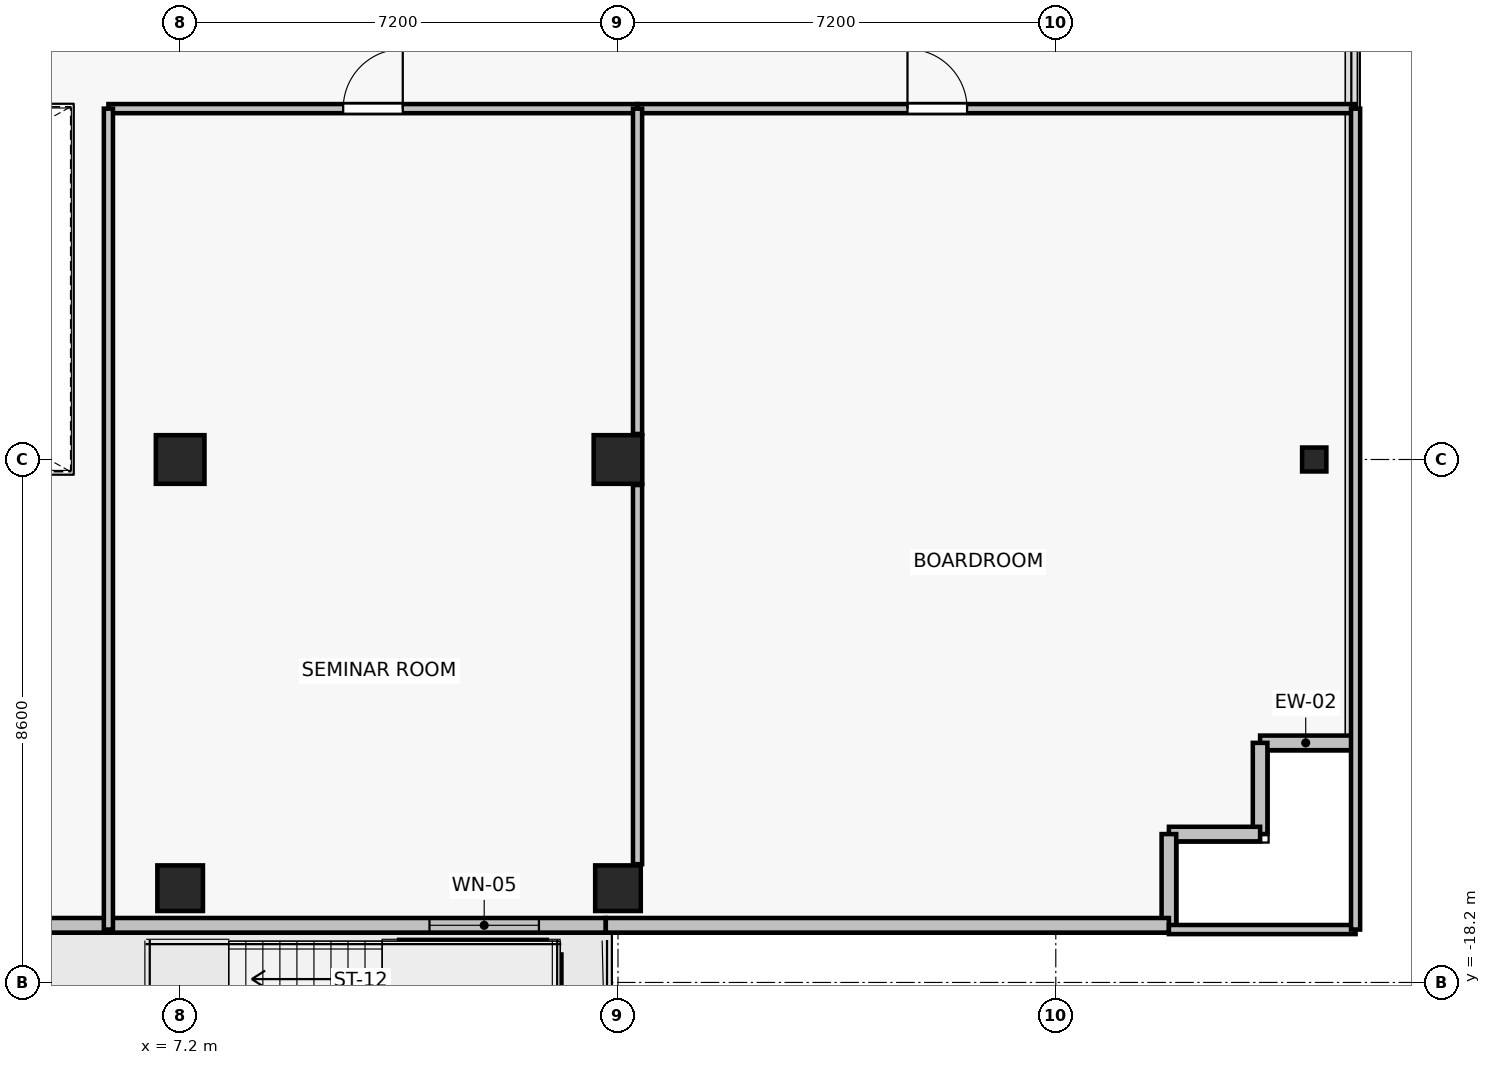
"""IFC4 building model, lengths in metres.
Left out: names, types, materials, properties, quantities, classifications, styles, units other than length and angle.
Written with IfcOpenShell. Run it as: python <this file> out.ifc"""

import sys

from ifc_helpers import new_model, si_unit, direction, frame, frame_2d, origin, origin_2d, place, context, subcontext, project, spatial, rectangle, i_section, extrude, source, transform, mapped, element, fill, save


model = new_model("IFC4")
c1 = context("Model", 3, precision=1e-05, world=origin(), true_north=direction((0.0, 1.0)))
c2 = subcontext(c1, "Body", "Model", "MODEL_VIEW")
j1 = project(units=[si_unit("LENGTHUNIT", "METRE"), si_unit("PLANEANGLEUNIT", "RADIAN")], contexts=[c1])
p1 = place(None, origin())
s1 = spatial("IfcSite", under=j1, at=p1, CompositionType="ELEMENT")
p2 = place(p1, origin())
s2 = spatial("IfcBuilding", under=s1, at=p2, CompositionType="ELEMENT")
p3 = place(p2, frame((0.0, 0.0, 172.6)))
s3 = spatial("IfcBuildingStorey", under=s2, at=p3, CompositionType="ELEMENT", Elevation=172.6)
for number, where, z_axis, x_axis in (
    (1, (7.2, -9.6, 0.0), (0.0, 0.0, 1.0), (1.0, 0.0, 0.0)),
    (2, (14.4, -9.6, 0.0), (0.0, 0.0, 1.0), (1.0, 0.0, 0.0)),
):
    element("IfcColumn", number, at=place(p3, frame(where, z_axis=z_axis, x_axis=x_axis)), inside=s3, PredefinedType="COLUMN", context=c2, shape_type="SweptSolid", body=[
        extrude(rectangle(XDim=0.8, YDim=0.8, at=origin_2d()), origin(), (0.0, 0.0, 1.0), 3.3),
    ])
for number, where, z_axis, x_axis in (
    (3, (7.2, -16.65, 0.0), (0.0, 0.0, 1.0), (1.0, 0.0, 0.0)),
    (4, (14.4, -16.65, 0.0), (0.0, 0.0, 1.0), (1.0, 0.0, 0.0)),
):
    element("IfcColumn", number, at=place(p3, frame(where, z_axis=z_axis, x_axis=x_axis)), inside=s3, PredefinedType="COLUMN", context=c2, shape_type="SweptSolid", body=[
        extrude(rectangle(XDim=0.75, YDim=0.75, at=origin_2d()), origin(), (0.0, 0.0, 1.0), 3.3),
    ])
p4 = place(p3, frame((25.85, -9.6, 0.0), z_axis=(0.0, 0.0, 1.0), x_axis=(1.0, 0.0, 0.0)))
e5 = element("IfcColumn", 5, at=p4, inside=s3, PredefinedType="COLUMN", context=c2, shape_type="SweptSolid", body=[
    extrude(i_section(OverallWidth=0.399, OverallDepth=0.394, WebThickness=0.023, FlangeThickness=0.037, FilletRadius=0.015, at=origin_2d()), origin(), (0.0, 0.0, 1.0), 3.3),
])
p5 = place(p3, frame((14.2, -17.26, 0.0), z_axis=(0.0, 0.0, 1.0), x_axis=(-1.0, 0.0, 0.0)))
e6 = element("IfcWall", 6, at=p5, inside=s3, PredefinedType="SOLIDWALL", context=c2, shape_type="SweptSolid", body=[
    extrude(rectangle(XDim=11.0, YDim=0.24, at=frame_2d((5.5, 0.0))), origin(), (0.0, 0.0, 1.0), 2.59),
])
p6 = place(p5, frame((9.25, 0.0, 0.0)))
e7 = element("IfcOpeningElement", 7, at=p6, cuts=e6, PredefinedType="OPENING", context=c2, shape_type="SweptSolid", body=[
    extrude(rectangle(XDim=1.5, YDim=2.2, at=frame_2d((0.75, 1.1))), frame((0.0, 0.13, 0.0), z_axis=(0.0, -1.0, 0.0), x_axis=(1.0, 0.0, 0.0)), (0.0, 0.0, 1.0), 0.26),
])
p7 = place(p5, frame((1.1, 0.0, 0.85)))
e8 = element("IfcOpeningElement", 8, at=p7, cuts=e6, PredefinedType="OPENING", context=c2, shape_type="SweptSolid", body=[
    extrude(rectangle(XDim=1.8, YDim=1.6, at=frame_2d((0.9, 0.8))), frame((0.0, 0.13, 0.0), z_axis=(0.0, -1.0, 0.0), x_axis=(1.0, 0.0, 0.0)), (0.0, 0.0, 1.0), 0.26),
])
for number, where, z_axis, x_axis in (
    (9, (24.96, -14.26, 0.0), (0.0, 0.0, 1.0), (1.0, 0.0, 0.0)),
    (10, (24.96, -15.76, 0.0), (0.0, 0.0, 1.0), (0.0, 1.0, 0.0)),
    (11, (23.46, -15.76, 0.0), (0.0, 0.0, 1.0), (1.0, 0.0, 0.0)),
    (12, (23.46, -17.26, 0.0), (0.0, 0.0, 1.0), (0.0, 1.0, 0.0)),
):
    element("IfcWall", number, at=place(p3, frame(where, z_axis=z_axis, x_axis=x_axis)), inside=s3, PredefinedType="SOLIDWALL", context=c2, shape_type="SweptSolid", body=[
        extrude(rectangle(XDim=1.5, YDim=0.24, at=frame_2d((0.75, 0.0))), origin(), (0.0, 0.0, 1.0), 3.075),
    ])
p8 = place(p3, frame((14.2, -17.26, 0.0), z_axis=(0.0, 0.0, 1.0), x_axis=(1.0, 0.0, 0.0)))
e13 = element("IfcWall", 13, at=p8, inside=s3, PredefinedType="SOLIDWALL", context=c2, shape_type="SweptSolid", body=[
    extrude(rectangle(XDim=9.26, YDim=0.24, at=frame_2d((4.63, 0.0))), origin(), (0.0, 0.0, 1.0), 3.075),
])
p9 = place(p3, frame((13.37, -19.92, -0.25), z_axis=(0.0, 0.0, 1.0), x_axis=(0.0, 1.0, 0.0)))
e14 = element("IfcWall", 14, at=p9, inside=s3, PredefinedType="SOLIDWALL", context=c2, shape_type="SweptSolid", body=[
    extrude(rectangle(XDim=2.18, YDim=0.2, at=frame_2d((1.09, 0.0))), origin(), (0.0, 0.0, 1.0), 1.7),
])
p10 = place(p3, frame((10.8, -17.6, -0.25), z_axis=(0.0, 0.0, 1.0), x_axis=(1.0, 0.0, 0.0)))
e15 = element("IfcWall", 15, at=p10, inside=s3, PredefinedType="SOLIDWALL", context=c2, shape_type="SweptSolid", body=[
    extrude(rectangle(XDim=2.43, YDim=0.2, at=frame_2d((1.215, 0.0))), origin(), (0.0, 0.0, 1.0), 1.7),
])
p11 = place(p3, frame((6.02, -3.83, 0.0), z_axis=(0.0, 0.0, 1.0), x_axis=(1.0, 0.0, 0.0)))
e16 = element("IfcWall", 16, at=p11, inside=s3, PredefinedType="PARTITIONING", context=c2, shape_type="SweptSolid", body=[
    extrude(rectangle(XDim=8.702, YDim=0.15, at=frame_2d((4.351, 0.0))), origin(), (0.0, 0.0, 1.0), 2.565),
])
p12 = place(p11, frame((3.861, 0.0, 0.0)))
e17 = element("IfcOpeningElement", 17, at=p12, cuts=e16, PredefinedType="OPENING", context=c2, shape_type="SweptSolid", body=[
    extrude(rectangle(XDim=0.98, YDim=2.15, at=frame_2d((0.49, 1.075))), frame((0.0, 0.085, 0.0), z_axis=(0.0, -1.0, 0.0), x_axis=(1.0, 0.0, 0.0)), (0.0, 0.0, 1.0), 0.17),
])
p13 = place(p3, frame((6.02, -17.33, 0.0), z_axis=(0.0, 0.0, 1.0), x_axis=(0.0, 1.0, 0.0)))
e18 = element("IfcWall", 18, at=p13, inside=s3, PredefinedType="PARTITIONING", context=c2, shape_type="SweptSolid", body=[
    extrude(rectangle(XDim=13.5, YDim=0.15, at=frame_2d((6.75, 0.0))), origin(), (0.0, 0.0, 1.0), 2.565),
])
p14 = place(p3, frame((14.722, -10.02, 0.0), z_axis=(0.0, 0.0, 1.0), x_axis=(0.0, -1.0, 0.0)))
e19 = element("IfcWall", 19, at=p14, inside=s3, PredefinedType="PARTITIONING", context=c2, shape_type="SweptSolid", body=[
    extrude(rectangle(XDim=6.235, YDim=0.15, at=frame_2d((3.117, 0.0))), origin(), (0.0, 0.0, 1.0), 3.075),
])
p15 = place(p3, frame((26.53, -17.33, 0.0), z_axis=(0.0, 0.0, 1.0), x_axis=(-1.0, 0.0, 0.0)))
e20 = element("IfcWall", 20, at=p15, inside=s3, PredefinedType="PARTITIONING", context=c2, shape_type="SweptSolid", body=[
    extrude(rectangle(XDim=3.07, YDim=0.15, at=frame_2d((1.535, 0.0))), origin(), (0.0, 0.0, 1.0), 3.075),
])
p16 = place(p3, frame((14.722, -3.83, 0.0), z_axis=(0.0, 0.0, 1.0), x_axis=(1.0, 0.0, 0.0)))
e21 = element("IfcWall", 21, at=p16, inside=s3, PredefinedType="PARTITIONING", context=c2, shape_type="SweptSolid", body=[
    extrude(rectangle(XDim=11.808, YDim=0.15, at=frame_2d((5.904, 0.0))), origin(), (0.0, 0.0, 1.0), 2.565),
])
p17 = place(p16, frame((4.439, 0.0, 0.0)))
e22 = element("IfcOpeningElement", 22, at=p17, cuts=e21, PredefinedType="OPENING", context=c2, shape_type="SweptSolid", body=[
    extrude(rectangle(XDim=0.98, YDim=2.15, at=frame_2d((0.49, 1.075))), frame((0.0, 0.085, 0.0), z_axis=(0.0, -1.0, 0.0), x_axis=(1.0, 0.0, 0.0)), (0.0, 0.0, 1.0), 0.17),
])
p18 = place(p3, frame((14.722, -9.18, 0.0), z_axis=(0.0, 0.0, 1.0), x_axis=(0.0, 1.0, 0.0)))
e23 = element("IfcWall", 23, at=p18, inside=s3, PredefinedType="PARTITIONING", context=c2, shape_type="SweptSolid", body=[
    extrude(rectangle(XDim=5.35, YDim=0.15, at=frame_2d((2.675, 0.0))), origin(), (0.0, 0.0, 1.0), 2.665),
])
p19 = place(p3, frame((26.53, -3.83, 0.0), z_axis=(0.0, 0.0, 1.0), x_axis=(0.0, -1.0, 0.0)))
e24 = element("IfcWall", 24, at=p19, inside=s3, PredefinedType="PARTITIONING", context=c2, shape_type="SweptSolid", body=[
    extrude(rectangle(XDim=13.5, YDim=0.15, at=frame_2d((6.75, 0.0))), origin(), (0.0, 0.0, 1.0), 2.665),
])
m1 = source(origin(), c2, "Body", "SweptSolid", [
    extrude(rectangle(XDim=1.8, YDim=1.6, at=frame_2d((0.9, 0.8))), frame((0.0, 0.03, 0.0), z_axis=(0.0, -1.0, 0.0), x_axis=(1.0, 0.0, 0.0)), (0.0, 0.0, 1.0), 0.06),
])
p20 = place(p7, origin())
e25 = element("IfcWindow", 25, at=p20, inside=s3, PartitioningType="SINGLE_PANEL", PredefinedType="WINDOW", context=c2, shape_type="MappedRepresentation", body=[
    mapped(m1, transform((0.0, 0.0, 0.0), x_axis=(1.0, 0.0, 0.0), y_axis=(0.0, 1.0, 0.0), z_axis=(0.0, 0.0, 1.0), scale=1.0)),
])
fill(e8, e25)
m2 = source(origin(), c2, "Body", "SweptSolid", [
    extrude(rectangle(XDim=0.98, YDim=2.15, at=frame_2d((0.49, 1.075))), frame((0.0, 0.025, 0.0), z_axis=(0.0, -1.0, 0.0), x_axis=(1.0, 0.0, 0.0)), (0.0, 0.0, 1.0), 0.05),
])
p21 = place(p12, origin())
e26 = element("IfcDoor", 26, at=p21, inside=s3, OperationType="SINGLE_SWING_RIGHT", PredefinedType="DOOR", context=c2, shape_type="MappedRepresentation", body=[
    mapped(m2, transform((0.0, 0.0, 0.0), x_axis=(1.0, 0.0, 0.0), y_axis=(0.0, 1.0, 0.0), z_axis=(0.0, 0.0, 1.0), scale=1.0)),
])
fill(e17, e26)
p22 = place(p17, origin())
e27 = element("IfcDoor", 27, at=p22, inside=s3, OperationType="SINGLE_SWING_LEFT", PredefinedType="DOOR", context=c2, shape_type="MappedRepresentation", body=[
    mapped(m2, transform((0.0, 0.0, 0.0), x_axis=(1.0, 0.0, 0.0), y_axis=(0.0, 1.0, 0.0), z_axis=(0.0, 0.0, 1.0), scale=1.0)),
])
fill(e22, e27)
save(model, sys.argv[1])
